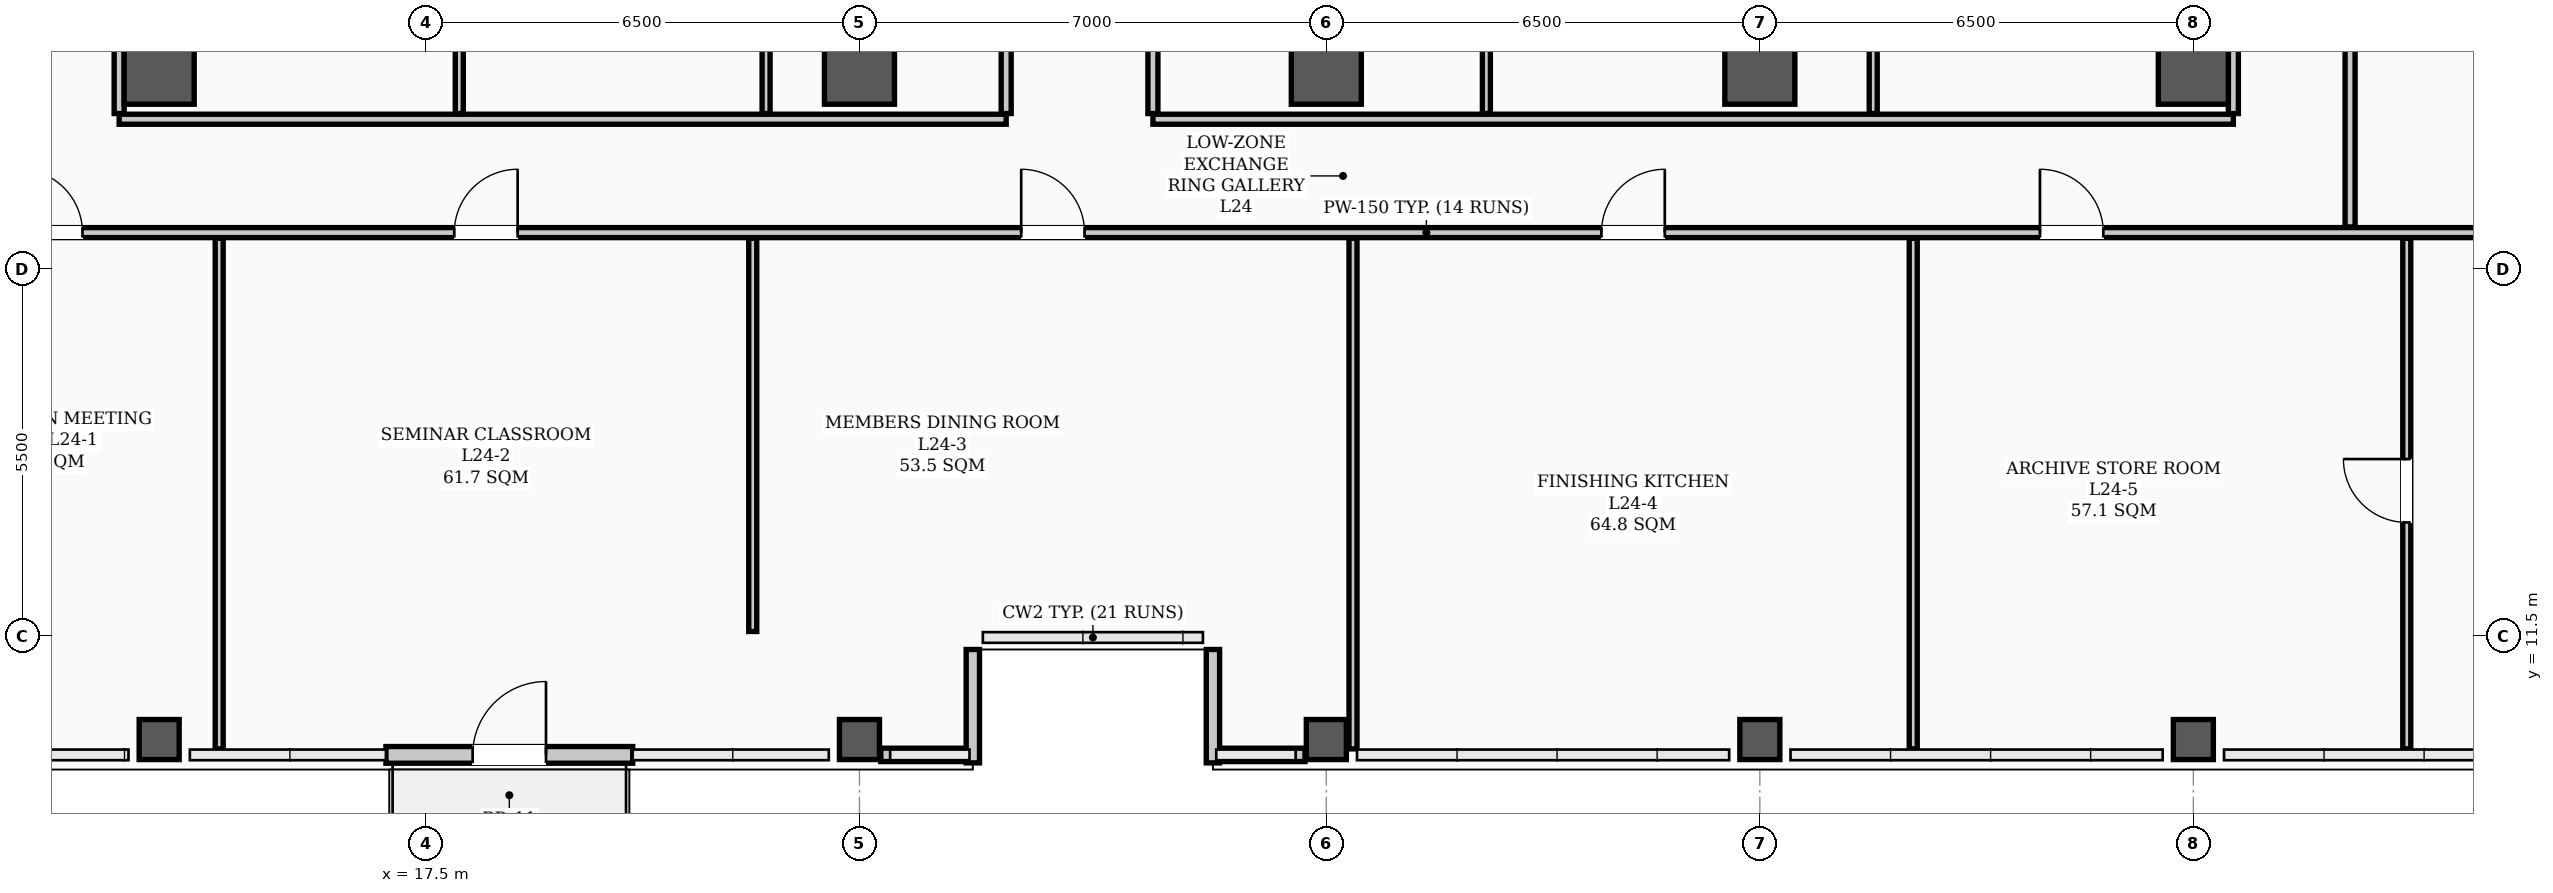
"""IFC4 building model, lengths in metres.
Left out: names, types, materials, properties, quantities, classifications, styles, units other than length and angle.
Written with IfcOpenShell. Run it as: python <this file> out.ifc"""

import sys

from ifc_helpers import new_model, si_unit, direction, frame, frame_2d, origin, origin_2d, place, context, subcontext, project, spatial, rectangle, hollow_rectangle, extrude, element, fill, save


model = new_model("IFC4")
c1 = context("Model", 3, precision=1e-05, world=origin(), true_north=direction((0.0, 1.0)))
c2 = subcontext(c1, "Body", "Model", "MODEL_VIEW")
j1 = project(units=[si_unit("LENGTHUNIT", "METRE"), si_unit("PLANEANGLEUNIT", "RADIAN")], contexts=[c1])
p1 = place(None, origin())
s1 = spatial("IfcSite", under=j1, at=p1, CompositionType="ELEMENT")
p2 = place(p1, origin())
s2 = spatial("IfcBuilding", under=s1, at=p2, CompositionType="ELEMENT")
p3 = place(p2, frame((0.0, 0.0, 96.7)))
s3 = spatial("IfcBuildingStorey", under=s2, at=p3, CompositionType="ELEMENT", Elevation=96.7)
for number, where, z_axis, x_axis in (
    (1, (13.5, 20.0, 0.0), (0.0, 0.0, 1.0), (1.0, 0.0, 0.0)),
    (2, (24.0, 20.0, 0.0), (0.0, 0.0, 1.0), (1.0, 0.0, 0.0)),
    (3, (31.0, 20.0, 0.0), (0.0, 0.0, 1.0), (1.0, 0.0, 0.0)),
    (4, (37.5, 20.0, 0.0), (0.0, 0.0, 1.0), (1.0, 0.0, 0.0)),
    (5, (44.0, 20.0, 0.0), (0.0, 0.0, 1.0), (1.0, 0.0, 0.0)),
):
    element("IfcColumn", number, at=place(p3, frame(where, z_axis=z_axis, x_axis=x_axis)), inside=s3, PredefinedType="COLUMN", context=c2, shape_type="SweptSolid", body=[
        extrude(hollow_rectangle(XDim=1.05, YDim=1.05, WallThickness=0.038, InnerFilletRadius=0.019, OuterFilletRadius=0.057, at=origin_2d()), origin(), (0.0, 0.0, 1.0), 3.9),
    ])
for number, where, z_axis, x_axis in (
    (6, (13.5, 9.95, 0.0), (0.0, 0.0, 1.0), (1.0, 0.0, 0.0)),
    (7, (24.0, 9.95, 0.0), (0.0, 0.0, 1.0), (1.0, 0.0, 0.0)),
    (8, (31.0, 9.95, 0.0), (0.0, 0.0, 1.0), (1.0, 0.0, 0.0)),
    (9, (37.5, 9.95, 0.0), (0.0, 0.0, 1.0), (1.0, 0.0, 0.0)),
    (10, (44.0, 9.95, 0.0), (0.0, 0.0, 1.0), (1.0, 0.0, 0.0)),
):
    element("IfcColumn", number, at=place(p3, frame(where, z_axis=z_axis, x_axis=x_axis)), inside=s3, PredefinedType="COLUMN", context=c2, shape_type="SweptSolid", body=[
        extrude(hollow_rectangle(XDim=0.6, YDim=0.6, WallThickness=0.026, InnerFilletRadius=0.013, OuterFilletRadius=0.039, at=origin_2d()), origin(), (0.0, 0.0, 1.0), 3.9),
    ])
for number, where, z_axis, x_axis in (
    (11, (24.32, 9.72, 0.0), (0.0, 0.0, 1.0), (1.0, 0.0, 0.0)),
    (12, (29.35, 9.72, 0.0), (0.0, 0.0, 1.0), (1.0, 0.0, 0.0)),
):
    element("IfcWall", number, at=place(p3, frame(where, z_axis=z_axis, x_axis=x_axis)), inside=s3, PredefinedType="PARAPET", context=c2, shape_type="SweptSolid", body=[
        extrude(rectangle(XDim=1.33, YDim=0.2, at=frame_2d((0.665, 0.0))), origin(), (0.0, 0.0, 1.0), 1.2),
    ])
for number, where, z_axis, x_axis in (
    (13, (25.7, 9.6, 0.0), (0.0, 0.0, 1.0), (0.0, 1.0, 0.0)),
    (14, (29.3, 11.3, 0.0), (0.0, 0.0, 1.0), (0.0, -1.0, 0.0)),
):
    element("IfcWall", number, at=place(p3, frame(where, z_axis=z_axis, x_axis=x_axis)), inside=s3, PredefinedType="PARAPET", context=c2, shape_type="SweptSolid", body=[
        extrude(rectangle(XDim=1.7, YDim=0.2, at=frame_2d((0.85, 0.0))), origin(), (0.0, 0.0, 1.0), 1.2),
    ])
p4 = place(p3, frame((16.9, 9.72, 0.0), z_axis=(0.0, 0.0, 1.0), x_axis=(1.0, 0.0, 0.0)))
e15 = element("IfcWall", 15, at=p4, inside=s3, PredefinedType="STANDARD", context=c2, shape_type="SweptSolid", body=[
    extrude(rectangle(XDim=3.7, YDim=0.25, at=frame_2d((1.85, 0.0))), origin(), (0.0, 0.0, 1.0), 2.16),
])
p5 = place(p4, frame((1.3, 0.0, 0.0)))
e16 = element("IfcOpeningElement", 16, at=p5, cuts=e15, PredefinedType="OPENING", context=c2, shape_type="SweptSolid", body=[
    extrude(rectangle(XDim=1.1, YDim=2.2, at=frame_2d((0.55, 1.1))), frame((0.0, 0.135, 0.0), z_axis=(0.0, -1.0, 0.0), x_axis=(1.0, 0.0, 0.0)), (0.0, 0.0, 1.0), 0.27),
])
p6 = place(p3, frame((7.81, 17.55, 0.0), z_axis=(0.0, 0.0, 1.0), x_axis=(1.0, 0.0, 0.0)))
e17 = element("IfcWall", 17, at=p6, inside=s3, PredefinedType="PARTITIONING", context=c2, shape_type="SweptSolid", body=[
    extrude(rectangle(XDim=49.38, YDim=0.15, at=frame_2d((24.69, 0.0))), origin(), (0.0, 0.0, 1.0), 2.18),
])
p7 = place(p6, frame((3.59, 0.0, 0.0)))
e18 = element("IfcOpeningElement", 18, at=p7, cuts=e17, PredefinedType="OPENING", context=c2, shape_type="SweptSolid", body=[
    extrude(rectangle(XDim=0.95, YDim=2.08, at=frame_2d((0.475, 1.04))), frame((0.0, 0.085, 0.0), z_axis=(0.0, -1.0, 0.0), x_axis=(1.0, 0.0, 0.0)), (0.0, 0.0, 1.0), 0.17),
])
p8 = place(p6, frame((10.115, 0.0, 0.0)))
e19 = element("IfcOpeningElement", 19, at=p8, cuts=e17, PredefinedType="OPENING", context=c2, shape_type="SweptSolid", body=[
    extrude(rectangle(XDim=0.95, YDim=2.08, at=frame_2d((0.475, 1.04))), frame((0.0, 0.085, 0.0), z_axis=(0.0, -1.0, 0.0), x_axis=(1.0, 0.0, 0.0)), (0.0, 0.0, 1.0), 0.17),
])
p9 = place(p6, frame((18.615, 0.0, 0.0)))
e20 = element("IfcOpeningElement", 20, at=p9, cuts=e17, PredefinedType="OPENING", context=c2, shape_type="SweptSolid", body=[
    extrude(rectangle(XDim=0.95, YDim=2.08, at=frame_2d((0.475, 1.04))), frame((0.0, 0.085, 0.0), z_axis=(0.0, -1.0, 0.0), x_axis=(1.0, 0.0, 0.0)), (0.0, 0.0, 1.0), 0.17),
])
p10 = place(p6, frame((27.315, 0.0, 0.0)))
e21 = element("IfcOpeningElement", 21, at=p10, cuts=e17, PredefinedType="OPENING", context=c2, shape_type="SweptSolid", body=[
    extrude(rectangle(XDim=0.95, YDim=2.08, at=frame_2d((0.475, 1.04))), frame((0.0, 0.085, 0.0), z_axis=(0.0, -1.0, 0.0), x_axis=(1.0, 0.0, 0.0)), (0.0, 0.0, 1.0), 0.17),
])
p11 = place(p6, frame((33.89, 0.0, 0.0)))
e22 = element("IfcOpeningElement", 22, at=p11, cuts=e17, PredefinedType="OPENING", context=c2, shape_type="SweptSolid", body=[
    extrude(rectangle(XDim=0.95, YDim=2.08, at=frame_2d((0.475, 1.04))), frame((0.0, 0.085, 0.0), z_axis=(0.0, -1.0, 0.0), x_axis=(1.0, 0.0, 0.0)), (0.0, 0.0, 1.0), 0.17),
])
p12 = place(p3, frame((12.9, 19.25, 0.0), z_axis=(0.0, 0.0, 1.0), x_axis=(1.0, 0.0, 0.0)))
e23 = element("IfcWall", 23, at=p12, inside=s3, PredefinedType="PARTITIONING", context=c2, shape_type="SweptSolid", body=[
    extrude(rectangle(XDim=13.3, YDim=0.15, at=frame_2d((6.65, 0.0))), origin(), (0.0, 0.0, 1.0), 2.18),
])
p13 = place(p3, frame((28.4, 19.25, 0.0), z_axis=(0.0, 0.0, 1.0), x_axis=(1.0, 0.0, 0.0)))
e24 = element("IfcWall", 24, at=p13, inside=s3, PredefinedType="PARTITIONING", context=c2, shape_type="SweptSolid", body=[
    extrude(rectangle(XDim=16.2, YDim=0.15, at=frame_2d((8.1, 0.0))), origin(), (0.0, 0.0, 1.0), 2.18),
])
for number, where, z_axis, x_axis in (
    (25, (26.2, 19.335, 0.0), (0.0, 0.0, 1.0), (0.0, 1.0, 0.0)),
    (26, (28.4, 19.335, 0.0), (0.0, 0.0, 1.0), (0.0, 1.0, 0.0)),
    (27, (12.9, 19.335, 0.0), (0.0, 0.0, 1.0), (0.0, 1.0, 0.0)),
):
    element("IfcWall", number, at=place(p3, frame(where, z_axis=z_axis, x_axis=x_axis)), inside=s3, PredefinedType="PARTITIONING", context=c2, shape_type="SweptSolid", body=[
        extrude(rectangle(XDim=7.38, YDim=0.15, at=frame_2d((3.69, 0.0))), origin(), (0.0, 0.0, 1.0), 2.18),
    ])
p14 = place(p3, frame((46.35, 17.635, 0.0), z_axis=(0.0, 0.0, 1.0), x_axis=(0.0, 1.0, 0.0)))
e28 = element("IfcWall", 28, at=p14, inside=s3, PredefinedType="PARTITIONING", context=c2, shape_type="SweptSolid", body=[
    extrude(rectangle(XDim=20.58, YDim=0.15, at=frame_2d((10.29, 0.0))), origin(), (0.0, 0.0, 1.0), 2.18),
])
p15 = place(p14, frame((3.265, 0.0, 0.0)))
e29 = element("IfcOpeningElement", 29, at=p15, cuts=e28, PredefinedType="OPENING", context=c2, shape_type="SweptSolid", body=[
    extrude(rectangle(XDim=0.95, YDim=2.08, at=frame_2d((0.475, 1.04))), frame((0.0, 0.085, 0.0), z_axis=(0.0, -1.0, 0.0), x_axis=(1.0, 0.0, 0.0)), (0.0, 0.0, 1.0), 0.17),
])
p16 = place(p14, frame((8.29, 0.0, 0.0)))
e30 = element("IfcOpeningElement", 30, at=p16, cuts=e28, PredefinedType="OPENING", context=c2, shape_type="SweptSolid", body=[
    extrude(rectangle(XDim=0.95, YDim=2.08, at=frame_2d((0.475, 1.04))), frame((0.0, 0.085, 0.0), z_axis=(0.0, -1.0, 0.0), x_axis=(1.0, 0.0, 0.0)), (0.0, 0.0, 1.0), 0.17),
])
p17 = place(p14, frame((16.34, 0.0, 0.0)))
e31 = element("IfcOpeningElement", 31, at=p17, cuts=e28, PredefinedType="OPENING", context=c2, shape_type="SweptSolid", body=[
    extrude(rectangle(XDim=0.95, YDim=2.08, at=frame_2d((0.475, 1.04))), frame((0.0, 0.085, 0.0), z_axis=(0.0, -1.0, 0.0), x_axis=(1.0, 0.0, 0.0)), (0.0, 0.0, 1.0), 0.17),
])
p18 = place(p3, frame((44.6, 19.335, 0.0), z_axis=(0.0, 0.0, 1.0), x_axis=(0.0, 1.0, 0.0)))
e32 = element("IfcWall", 32, at=p18, inside=s3, PredefinedType="PARTITIONING", context=c2, shape_type="SweptSolid", body=[
    extrude(rectangle(XDim=7.38, YDim=0.15, at=frame_2d((3.69, 0.0))), origin(), (0.0, 0.0, 1.0), 2.18),
])
p19 = place(p3, frame((14.4, 9.81, 0.0), z_axis=(0.0, 0.0, 1.0), x_axis=(0.0, 1.0, 0.0)))
e33 = element("IfcWall", 33, at=p19, inside=s3, PredefinedType="PARTITIONING", context=c2, shape_type="SweptSolid", body=[
    extrude(rectangle(XDim=7.655, YDim=0.12, at=frame_2d((3.828, 0.0))), origin(), (0.0, 0.0, 1.0), 2.18),
])
p20 = place(p3, frame((22.4, 11.57, 0.0), z_axis=(0.0, 0.0, 1.0), x_axis=(0.0, 1.0, 0.0)))
e34 = element("IfcWall", 34, at=p20, inside=s3, PredefinedType="PARTITIONING", context=c2, shape_type="SweptSolid", body=[
    extrude(rectangle(XDim=5.895, YDim=0.12, at=frame_2d((2.948, 0.0))), origin(), (0.0, 0.0, 1.0), 3.18),
])
for number, where, z_axis, x_axis in (
    (35, (31.4, 9.81, 0.0), (0.0, 0.0, 1.0), (0.0, 1.0, 0.0)),
    (36, (39.8, 9.81, 0.0), (0.0, 0.0, 1.0), (0.0, 1.0, 0.0)),
):
    element("IfcWall", number, at=place(p3, frame(where, z_axis=z_axis, x_axis=x_axis)), inside=s3, PredefinedType="PARTITIONING", context=c2, shape_type="SweptSolid", body=[
        extrude(rectangle(XDim=7.655, YDim=0.12, at=frame_2d((3.828, 0.0))), origin(), (0.0, 0.0, 1.0), 2.18),
    ])
p21 = place(p3, frame((47.2, 9.81, 0.0), z_axis=(0.0, 0.0, 1.0), x_axis=(0.0, 1.0, 0.0)))
e37 = element("IfcWall", 37, at=p21, inside=s3, PredefinedType="PARTITIONING", context=c2, shape_type="SweptSolid", body=[
    extrude(rectangle(XDim=7.655, YDim=0.12, at=frame_2d((3.828, 0.0))), origin(), (0.0, 0.0, 1.0), 3.6),
])
p22 = place(p21, frame((3.395, 0.0, 0.0)))
e38 = element("IfcOpeningElement", 38, at=p22, cuts=e37, PredefinedType="OPENING", context=c2, shape_type="SweptSolid", body=[
    extrude(rectangle(XDim=0.95, YDim=2.08, at=frame_2d((0.475, 1.04))), frame((0.0, 0.07, 0.0), z_axis=(0.0, -1.0, 0.0), x_axis=(1.0, 0.0, 0.0)), (0.0, 0.0, 1.0), 0.14),
])
for number, where, z_axis, x_axis in (
    (39, (18.0, 19.335, 0.0), (0.0, 0.0, 1.0), (0.0, 1.0, 0.0)),
    (40, (22.6, 19.335, 0.0), (0.0, 0.0, 1.0), (0.0, 1.0, 0.0)),
    (41, (33.4, 19.335, 0.0), (0.0, 0.0, 1.0), (0.0, 1.0, 0.0)),
    (42, (39.2, 19.335, 0.0), (0.0, 0.0, 1.0), (0.0, 1.0, 0.0)),
):
    element("IfcWall", number, at=place(p3, frame(where, z_axis=z_axis, x_axis=x_axis)), inside=s3, PredefinedType="PARTITIONING", context=c2, shape_type="SweptSolid", body=[
        extrude(rectangle(XDim=7.38, YDim=0.12, at=frame_2d((3.69, 0.0))), origin(), (0.0, 0.0, 1.0), 2.18),
    ])
p23 = place(p5, origin())
e43 = element("IfcDoor", 43, at=p23, inside=s3, OperationType="SINGLE_SWING_RIGHT", PredefinedType="DOOR", context=c2, shape_type="SweptSolid", body=[
    extrude(rectangle(XDim=1.1, YDim=2.2, at=frame_2d((0.55, 1.1))), frame((0.0, 0.025, 0.0), z_axis=(0.0, -1.0, 0.0), x_axis=(1.0, 0.0, 0.0)), (0.0, 0.0, 1.0), 0.05),
])
fill(e16, e43)
p24 = place(p7, origin())
e44 = element("IfcDoor", 44, at=p24, inside=s3, OperationType="SINGLE_SWING_LEFT", PredefinedType="DOOR", context=c2, shape_type="SweptSolid", body=[
    extrude(rectangle(XDim=0.95, YDim=2.08, at=frame_2d((0.475, 1.04))), frame((0.0, 0.025, 0.0), z_axis=(0.0, -1.0, 0.0), x_axis=(1.0, 0.0, 0.0)), (0.0, 0.0, 1.0), 0.05),
])
fill(e18, e44)
p25 = place(p8, origin())
e45 = element("IfcDoor", 45, at=p25, inside=s3, OperationType="SINGLE_SWING_RIGHT", PredefinedType="DOOR", context=c2, shape_type="SweptSolid", body=[
    extrude(rectangle(XDim=0.95, YDim=2.08, at=frame_2d((0.475, 1.04))), frame((0.0, 0.025, 0.0), z_axis=(0.0, -1.0, 0.0), x_axis=(1.0, 0.0, 0.0)), (0.0, 0.0, 1.0), 0.05),
])
fill(e19, e45)
p26 = place(p9, origin())
e46 = element("IfcDoor", 46, at=p26, inside=s3, OperationType="SINGLE_SWING_LEFT", PredefinedType="DOOR", context=c2, shape_type="SweptSolid", body=[
    extrude(rectangle(XDim=0.95, YDim=2.08, at=frame_2d((0.475, 1.04))), frame((0.0, 0.025, 0.0), z_axis=(0.0, -1.0, 0.0), x_axis=(1.0, 0.0, 0.0)), (0.0, 0.0, 1.0), 0.05),
])
fill(e20, e46)
p27 = place(p10, origin())
e47 = element("IfcDoor", 47, at=p27, inside=s3, OperationType="SINGLE_SWING_RIGHT", PredefinedType="DOOR", context=c2, shape_type="SweptSolid", body=[
    extrude(rectangle(XDim=0.95, YDim=2.08, at=frame_2d((0.475, 1.04))), frame((0.0, 0.025, 0.0), z_axis=(0.0, -1.0, 0.0), x_axis=(1.0, 0.0, 0.0)), (0.0, 0.0, 1.0), 0.05),
])
fill(e21, e47)
p28 = place(p11, origin())
e48 = element("IfcDoor", 48, at=p28, inside=s3, OperationType="SINGLE_SWING_LEFT", PredefinedType="DOOR", context=c2, shape_type="SweptSolid", body=[
    extrude(rectangle(XDim=0.95, YDim=2.08, at=frame_2d((0.475, 1.04))), frame((0.0, 0.025, 0.0), z_axis=(0.0, -1.0, 0.0), x_axis=(1.0, 0.0, 0.0)), (0.0, 0.0, 1.0), 0.05),
])
fill(e22, e48)
p29 = place(p22, origin())
e49 = element("IfcDoor", 49, at=p29, inside=s3, OperationType="SINGLE_SWING_RIGHT", PredefinedType="DOOR", context=c2, shape_type="SweptSolid", body=[
    extrude(rectangle(XDim=0.95, YDim=2.08, at=frame_2d((0.475, 1.04))), frame((0.0, 0.025, 0.0), z_axis=(0.0, -1.0, 0.0), x_axis=(1.0, 0.0, 0.0)), (0.0, 0.0, 1.0), 0.05),
])
fill(e38, e49)
save(model, sys.argv[1])
